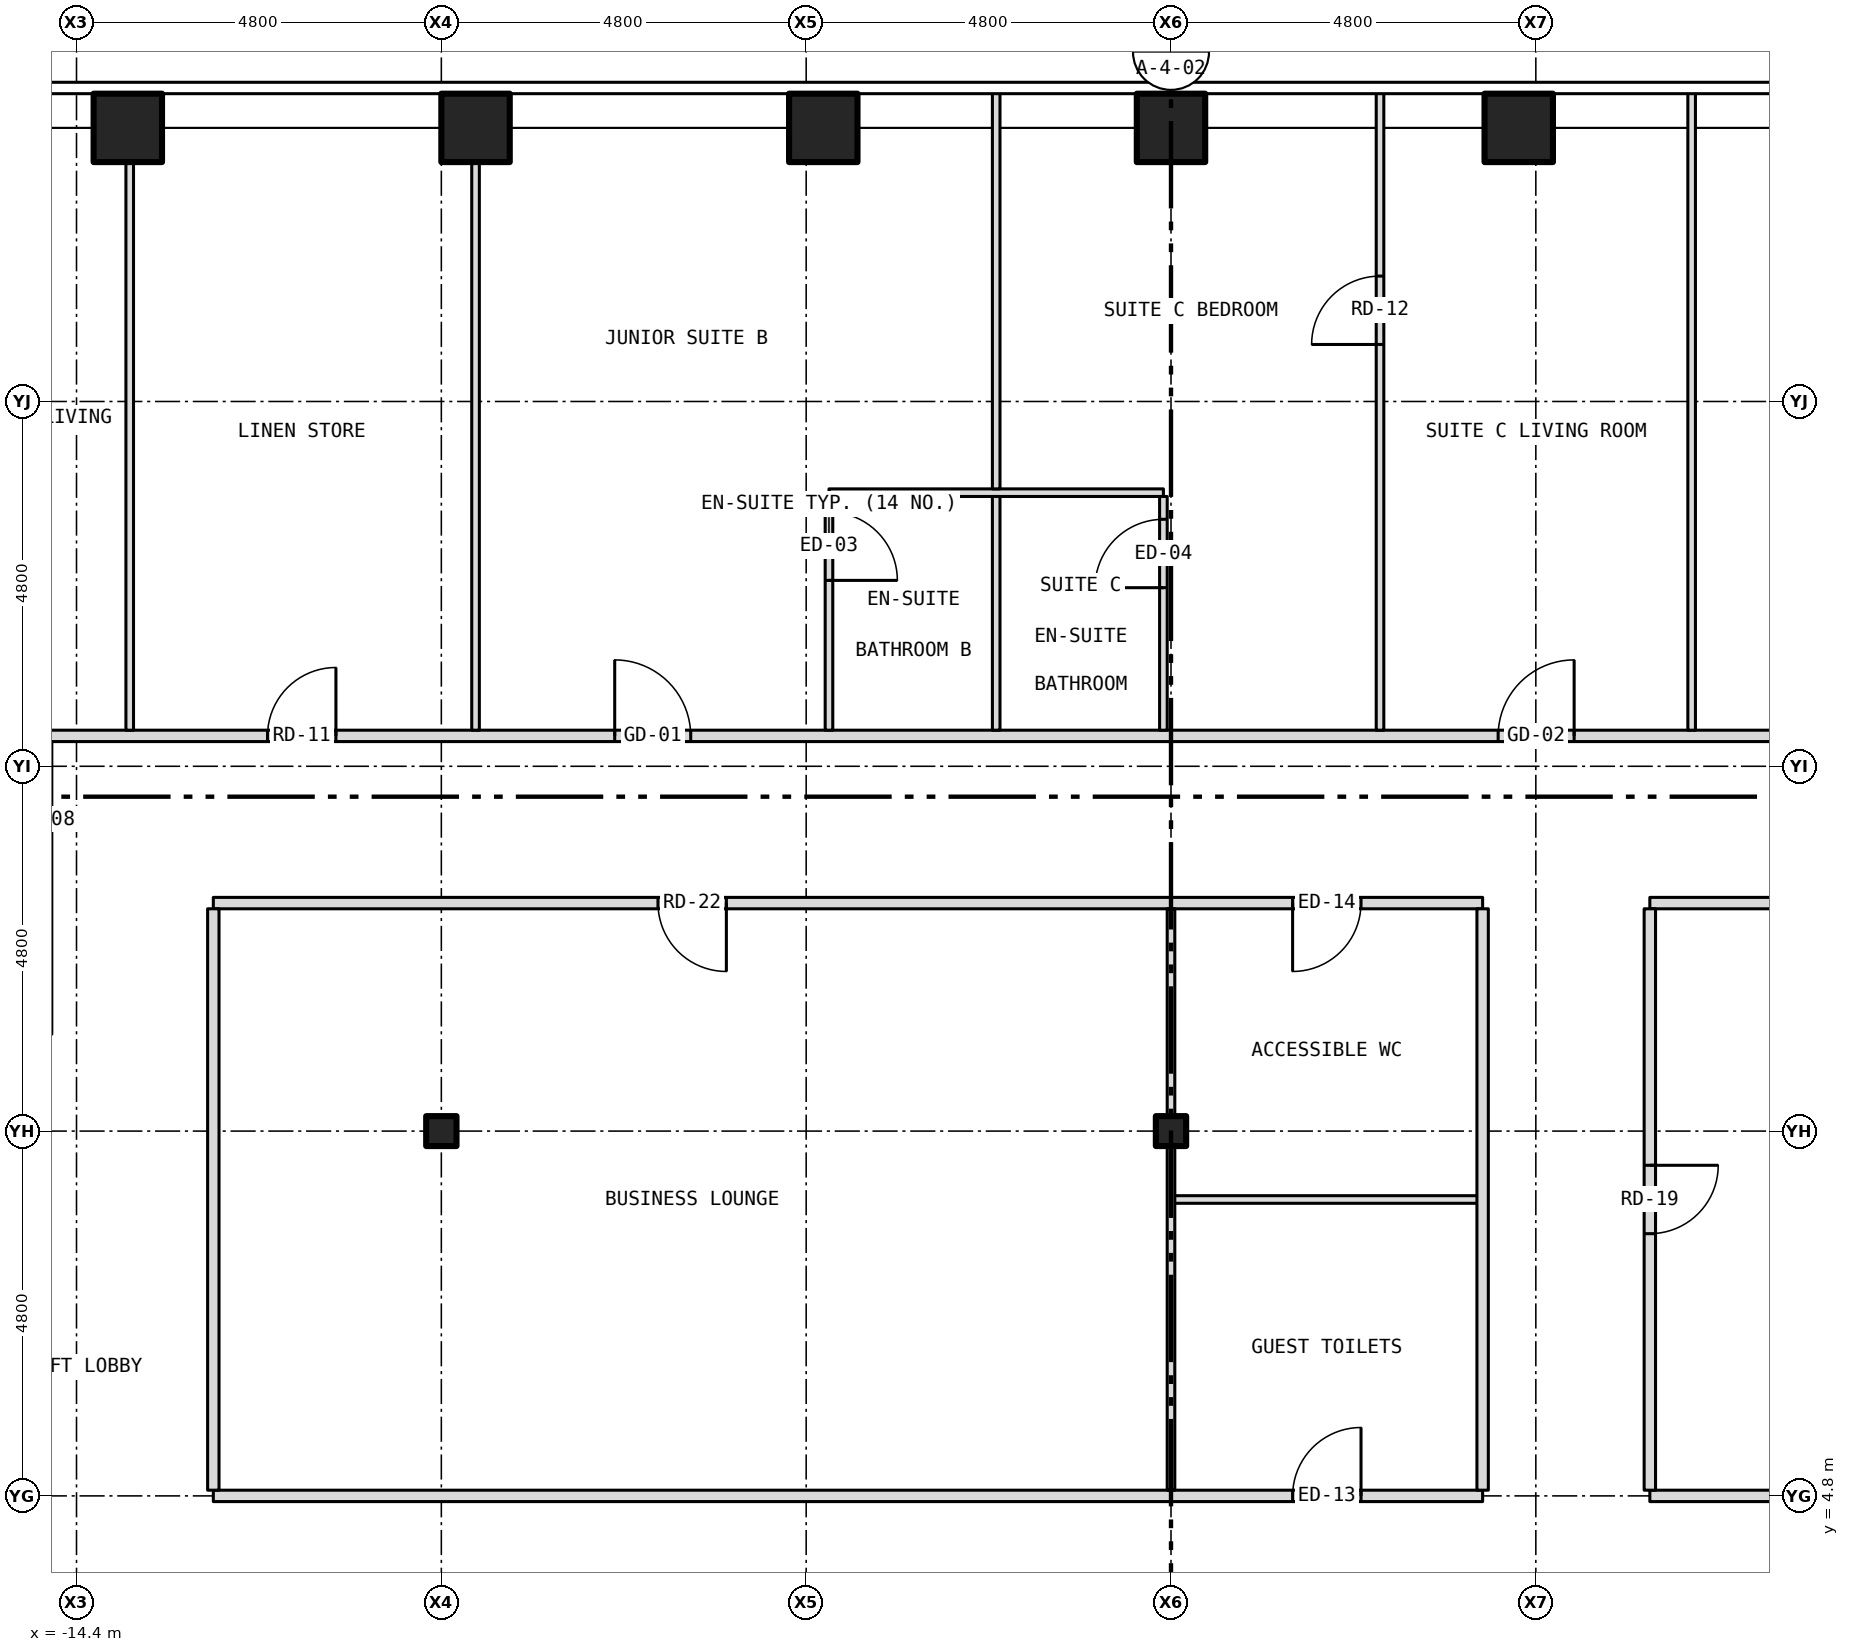
"""IFC4 building model, lengths in metres.
Left out: names, types, materials, properties, quantities, classifications, styles, units other than length and angle.
Written with IfcOpenShell. Run it as: python <this file> out.ifc"""

import sys

from ifc_helpers import new_model, si_unit, direction, frame, frame_2d, origin, origin_2d, place, context, subcontext, project, spatial, rectangle, hollow_rectangle, i_section, extrude, element, fill, save


model = new_model("IFC4")
c1 = context("Model", 3, precision=1e-05, world=origin(), true_north=direction((0.0, 1.0)))
c2 = subcontext(c1, "Body", "Model", "MODEL_VIEW")
j1 = project(units=[si_unit("LENGTHUNIT", "METRE"), si_unit("PLANEANGLEUNIT", "RADIAN")], contexts=[c1])
p1 = place(None, origin())
s1 = spatial("IfcSite", under=j1, at=p1, CompositionType="ELEMENT")
p2 = place(p1, origin())
s2 = spatial("IfcBuilding", under=s1, at=p2, CompositionType="ELEMENT")
p3 = place(p2, frame((0.0, 0.0, 113.5)))
s3 = spatial("IfcBuildingStorey", under=s2, at=p3, CompositionType="ELEMENT", Elevation=113.5)
for number, where, z_axis, x_axis in (
    (1, (-13.725, 22.8, -0.15), (0.0, 0.0, 1.0), (1.0, 0.0, 0.0)),
    (2, (-9.15, 22.8, -0.15), (0.0, 0.0, 1.0), (1.0, 0.0, 0.0)),
    (3, (-4.575, 22.8, -0.15), (0.0, 0.0, 1.0), (1.0, 0.0, 0.0)),
    (4, (0.0, 22.8, -0.15), (0.0, 0.0, 1.0), (1.0, 0.0, 0.0)),
    (5, (4.575, 22.8, -0.15), (0.0, 0.0, 1.0), (1.0, 0.0, 0.0)),
):
    element("IfcColumn", number, at=place(p3, frame(where, z_axis=z_axis, x_axis=x_axis)), inside=s3, PredefinedType="COLUMN", context=c2, shape_type="SweptSolid", body=[
        extrude(hollow_rectangle(XDim=0.9, YDim=0.9, WallThickness=0.05, at=origin_2d()), origin(), (0.0, 0.0, 1.0), 3.5),
    ])
for number, where, z_axis, x_axis in (
    (6, (-9.6, 9.6, -0.15), (0.0, 0.0, 1.0), (1.0, 0.0, 0.0)),
    (7, (0.0, 9.6, -0.15), (0.0, 0.0, 1.0), (1.0, 0.0, 0.0)),
):
    element("IfcColumn", number, at=place(p3, frame(where, z_axis=z_axis, x_axis=x_axis)), inside=s3, PredefinedType="COLUMN", context=c2, shape_type="SweptSolid", body=[
        extrude(i_section(OverallWidth=0.399, OverallDepth=0.394, WebThickness=0.023, FlangeThickness=0.037, at=origin_2d()), origin(), (0.0, 0.0, 1.0), 3.5),
    ])
p4 = place(p3, frame((-12.6, 4.8, 0.0), z_axis=(0.0, 0.0, 1.0), x_axis=(1.0, 0.0, 0.0)))
e8 = element("IfcWall", 8, at=p4, inside=s3, PredefinedType="PARTITIONING", context=c2, shape_type="SweptSolid", body=[
    extrude(rectangle(XDim=16.7, YDim=0.15, at=frame_2d((8.35, 0.0))), origin(), (0.0, 0.0, 1.0), 3.35),
])
p5 = place(p4, frame((14.2, 0.0, 0.0)))
e9 = element("IfcOpeningElement", 9, at=p5, cuts=e8, PredefinedType="OPENING", context=c2, shape_type="SweptSolid", body=[
    extrude(rectangle(XDim=0.9, YDim=2.1, at=frame_2d((0.45, 1.05))), frame((0.0, 0.087, 0.0), z_axis=(0.0, -1.0, 0.0), x_axis=(1.0, 0.0, 0.0)), (0.0, 0.0, 1.0), 0.174),
])
p6 = place(p3, frame((6.3, 4.8, 0.0), z_axis=(0.0, 0.0, 1.0), x_axis=(1.0, 0.0, 0.0)))
e10 = element("IfcWall", 10, at=p6, inside=s3, PredefinedType="PARTITIONING", context=c2, shape_type="SweptSolid", body=[
    extrude(rectangle(XDim=6.3, YDim=0.15, at=frame_2d((3.15, 0.0))), origin(), (0.0, 0.0, 1.0), 3.35),
])
p7 = place(p3, frame((0.0, 8.7, 0.0), z_axis=(0.0, 0.0, 1.0), x_axis=(1.0, 0.0, 0.0)))
e11 = element("IfcWall", 11, at=p7, inside=s3, PredefinedType="PARTITIONING", context=c2, shape_type="SweptSolid", body=[
    extrude(rectangle(XDim=4.1, YDim=0.1, at=frame_2d((2.05, 0.0))), origin(), (0.0, 0.0, 1.0), 3.35),
])
p8 = place(p3, frame((-12.6, 12.6, 0.0), z_axis=(0.0, 0.0, 1.0), x_axis=(1.0, 0.0, 0.0)))
e12 = element("IfcWall", 12, at=p8, inside=s3, PredefinedType="PARTITIONING", context=c2, shape_type="SweptSolid", body=[
    extrude(rectangle(XDim=16.7, YDim=0.15, at=frame_2d((8.35, 0.0))), origin(), (0.0, 0.0, 1.0), 3.35),
])
p9 = place(p8, frame((14.2, 0.0, 0.0)))
e13 = element("IfcOpeningElement", 13, at=p9, cuts=e12, PredefinedType="OPENING", context=c2, shape_type="SweptSolid", body=[
    extrude(rectangle(XDim=0.9, YDim=2.1, at=frame_2d((0.45, 1.05))), frame((0.0, 0.087, 0.0), z_axis=(0.0, -1.0, 0.0), x_axis=(1.0, 0.0, 0.0)), (0.0, 0.0, 1.0), 0.174),
])
p10 = place(p8, frame((5.85, 0.0, 0.0)))
e14 = element("IfcOpeningElement", 14, at=p10, cuts=e12, PredefinedType="OPENING", context=c2, shape_type="SweptSolid", body=[
    extrude(rectangle(XDim=0.9, YDim=2.1, at=frame_2d((0.45, 1.05))), frame((0.0, 0.087, 0.0), z_axis=(0.0, -1.0, 0.0), x_axis=(1.0, 0.0, 0.0)), (0.0, 0.0, 1.0), 0.174),
])
p11 = place(p3, frame((6.3, 12.6, 0.0), z_axis=(0.0, 0.0, 1.0), x_axis=(1.0, 0.0, 0.0)))
e15 = element("IfcWall", 15, at=p11, inside=s3, PredefinedType="PARTITIONING", context=c2, shape_type="SweptSolid", body=[
    extrude(rectangle(XDim=6.3, YDim=0.15, at=frame_2d((3.15, 0.0))), origin(), (0.0, 0.0, 1.0), 3.35),
])
p12 = place(p3, frame((-14.8, 14.8, 0.0), z_axis=(0.0, 0.0, 1.0), x_axis=(1.0, 0.0, 0.0)))
e16 = element("IfcWall", 16, at=p12, inside=s3, PredefinedType="PARTITIONING", context=c2, shape_type="SweptSolid", body=[
    extrude(rectangle(XDim=29.6, YDim=0.15, at=frame_2d((14.8, 0.0))), origin(), (0.0, 0.0, 1.0), 3.35),
])
p13 = place(p12, frame((2.913, 0.0, 0.0)))
e17 = element("IfcOpeningElement", 17, at=p13, cuts=e16, PredefinedType="OPENING", context=c2, shape_type="SweptSolid", body=[
    extrude(rectangle(XDim=0.9, YDim=2.1, at=frame_2d((0.45, 1.05))), frame((0.0, 0.087, 0.0), z_axis=(0.0, -1.0, 0.0), x_axis=(1.0, 0.0, 0.0)), (0.0, 0.0, 1.0), 0.174),
])
p14 = place(p12, frame((7.481, 0.0, 0.0)))
e18 = element("IfcOpeningElement", 18, at=p14, cuts=e16, PredefinedType="OPENING", context=c2, shape_type="SweptSolid", body=[
    extrude(rectangle(XDim=1.0, YDim=2.1, at=frame_2d((0.5, 1.05))), frame((0.0, 0.087, 0.0), z_axis=(0.0, -1.0, 0.0), x_axis=(1.0, 0.0, 0.0)), (0.0, 0.0, 1.0), 0.174),
])
p15 = place(p12, frame((19.104, 0.0, 0.0)))
e19 = element("IfcOpeningElement", 19, at=p15, cuts=e16, PredefinedType="OPENING", context=c2, shape_type="SweptSolid", body=[
    extrude(rectangle(XDim=1.0, YDim=2.1, at=frame_2d((0.5, 1.05))), frame((0.0, 0.087, 0.0), z_axis=(0.0, -1.0, 0.0), x_axis=(1.0, 0.0, 0.0)), (0.0, 0.0, 1.0), 0.174),
])
p16 = place(p12, frame((23.494, 0.0, 0.0)))
e20 = element("IfcOpeningElement", 20, at=p16, cuts=e16, PredefinedType="OPENING", context=c2, shape_type="SweptSolid", body=[
    extrude(rectangle(XDim=1.0, YDim=2.1, at=frame_2d((0.5, 1.05))), frame((0.0, 0.087, 0.0), z_axis=(0.0, -1.0, 0.0), x_axis=(1.0, 0.0, 0.0)), (0.0, 0.0, 1.0), 0.174),
])
p17 = place(p3, frame((-4.5, 18.0, 0.0), z_axis=(0.0, 0.0, 1.0), x_axis=(1.0, 0.0, 0.0)))
e21 = element("IfcWall", 21, at=p17, inside=s3, PredefinedType="PARTITIONING", context=c2, shape_type="SweptSolid", body=[
    extrude(rectangle(XDim=4.4, YDim=0.1, at=frame_2d((2.2, 0.0))), origin(), (0.0, 0.0, 1.0), 3.35),
])
p18 = place(p3, frame((-13.7, 14.875, 0.0), z_axis=(0.0, 0.0, 1.0), x_axis=(0.0, 1.0, 0.0)))
e22 = element("IfcWall", 22, at=p18, inside=s3, PredefinedType="PARTITIONING", context=c2, shape_type="SweptSolid", body=[
    extrude(rectangle(XDim=7.805, YDim=0.1, at=frame_2d((3.902, 0.0))), origin(), (0.0, 0.0, 1.0), 3.35),
])
p19 = place(p3, frame((-12.6, 4.875, 0.0), z_axis=(0.0, 0.0, 1.0), x_axis=(0.0, 1.0, 0.0)))
e23 = element("IfcWall", 23, at=p19, inside=s3, PredefinedType="PARTITIONING", context=c2, shape_type="SweptSolid", body=[
    extrude(rectangle(XDim=7.65, YDim=0.15, at=frame_2d((3.825, 0.0))), origin(), (0.0, 0.0, 1.0), 3.35),
])
p20 = place(p3, frame((-9.15, 14.875, 0.0), z_axis=(0.0, 0.0, 1.0), x_axis=(0.0, 1.0, 0.0)))
e24 = element("IfcWall", 24, at=p20, inside=s3, PredefinedType="PARTITIONING", context=c2, shape_type="SweptSolid", body=[
    extrude(rectangle(XDim=7.805, YDim=0.1, at=frame_2d((3.902, 0.0))), origin(), (0.0, 0.0, 1.0), 3.35),
])
p21 = place(p3, frame((-4.5, 14.875, 0.0), z_axis=(0.0, 0.0, 1.0), x_axis=(0.0, 1.0, 0.0)))
e25 = element("IfcWall", 25, at=p21, inside=s3, PredefinedType="PARTITIONING", context=c2, shape_type="SweptSolid", body=[
    extrude(rectangle(XDim=3.075, YDim=0.1, at=frame_2d((1.538, 0.0))), origin(), (0.0, 0.0, 1.0), 3.35),
])
p22 = place(p21, frame((1.971, 0.0, 0.0)))
e26 = element("IfcOpeningElement", 26, at=p22, cuts=e25, PredefinedType="OPENING", context=c2, shape_type="SweptSolid", body=[
    extrude(rectangle(XDim=0.9, YDim=2.1, at=frame_2d((0.45, 1.05))), frame((0.0, 0.062, 0.0), z_axis=(0.0, -1.0, 0.0), x_axis=(1.0, 0.0, 0.0)), (0.0, 0.0, 1.0), 0.124),
])
p23 = place(p3, frame((-2.3, 14.875, 0.0), z_axis=(0.0, 0.0, 1.0), x_axis=(0.0, 1.0, 0.0)))
e27 = element("IfcWall", 27, at=p23, inside=s3, PredefinedType="PARTITIONING", context=c2, shape_type="SweptSolid", body=[
    extrude(rectangle(XDim=3.075, YDim=0.1, at=frame_2d((1.538, 0.0))), origin(), (0.0, 0.0, 1.0), 3.35),
])
p24 = place(p3, frame((-2.3, 18.05, 0.0), z_axis=(0.0, 0.0, 1.0), x_axis=(0.0, 1.0, 0.0)))
e28 = element("IfcWall", 28, at=p24, inside=s3, PredefinedType="PARTITIONING", context=c2, shape_type="SweptSolid", body=[
    extrude(rectangle(XDim=5.23, YDim=0.1, at=frame_2d((2.615, 0.0))), origin(), (0.0, 0.0, 1.0), 3.35),
])
p25 = place(p3, frame((-0.1, 14.875, 0.0), z_axis=(0.0, 0.0, 1.0), x_axis=(0.0, 1.0, 0.0)))
e29 = element("IfcWall", 29, at=p25, inside=s3, PredefinedType="PARTITIONING", context=c2, shape_type="SweptSolid", body=[
    extrude(rectangle(XDim=3.075, YDim=0.1, at=frame_2d((1.538, 0.0))), origin(), (0.0, 0.0, 1.0), 2.728),
])
p26 = place(p25, frame((1.875, 0.0, 0.0)))
e30 = element("IfcOpeningElement", 30, at=p26, cuts=e29, PredefinedType="OPENING", context=c2, shape_type="SweptSolid", body=[
    extrude(rectangle(XDim=0.9, YDim=2.1, at=frame_2d((0.45, 1.05))), frame((0.0, 0.062, 0.0), z_axis=(0.0, -1.0, 0.0), x_axis=(1.0, 0.0, 0.0)), (0.0, 0.0, 1.0), 0.124),
])
p27 = place(p3, frame((0.0, 4.875, 0.0), z_axis=(0.0, 0.0, 1.0), x_axis=(0.0, 1.0, 0.0)))
e31 = element("IfcWall", 31, at=p27, inside=s3, PredefinedType="PARTITIONING", context=c2, shape_type="SweptSolid", body=[
    extrude(rectangle(XDim=4.526, YDim=0.1, at=frame_2d((2.263, 0.0))), origin(), (0.0, 0.0, 1.0), 2.728),
])
p28 = place(p3, frame((0.0, 9.401, 0.0), z_axis=(0.0, 0.0, 1.0), x_axis=(0.0, 1.0, 0.0)))
e32 = element("IfcWall", 32, at=p28, inside=s3, PredefinedType="PARTITIONING", context=c2, shape_type="SweptSolid", body=[
    extrude(rectangle(XDim=0.398, YDim=0.1, at=frame_2d((0.199, 0.0))), origin(), (0.0, 0.0, 1.0), 3.35),
])
p29 = place(p3, frame((0.0, 9.799, 0.0), z_axis=(0.0, 0.0, 1.0), x_axis=(0.0, 1.0, 0.0)))
e33 = element("IfcWall", 33, at=p29, inside=s3, PredefinedType="PARTITIONING", context=c2, shape_type="SweptSolid", body=[
    extrude(rectangle(XDim=2.726, YDim=0.1, at=frame_2d((1.363, 0.0))), origin(), (0.0, 0.0, 1.0), 2.728),
])
p30 = place(p3, frame((2.75, 14.875, 0.0), z_axis=(0.0, 0.0, 1.0), x_axis=(0.0, 1.0, 0.0)))
e34 = element("IfcWall", 34, at=p30, inside=s3, PredefinedType="PARTITIONING", context=c2, shape_type="SweptSolid", body=[
    extrude(rectangle(XDim=8.405, YDim=0.1, at=frame_2d((4.203, 0.0))), origin(), (0.0, 0.0, 1.0), 3.35),
])
p31 = place(p30, frame((5.075, 0.0, 0.0)))
e35 = element("IfcOpeningElement", 35, at=p31, cuts=e34, PredefinedType="OPENING", context=c2, shape_type="SweptSolid", body=[
    extrude(rectangle(XDim=0.9, YDim=2.1, at=frame_2d((0.45, 1.05))), frame((0.0, 0.062, 0.0), z_axis=(0.0, -1.0, 0.0), x_axis=(1.0, 0.0, 0.0)), (0.0, 0.0, 1.0), 0.124),
])
p32 = place(p3, frame((4.1, 4.875, 0.0), z_axis=(0.0, 0.0, 1.0), x_axis=(0.0, 1.0, 0.0)))
e36 = element("IfcWall", 36, at=p32, inside=s3, PredefinedType="PARTITIONING", context=c2, shape_type="SweptSolid", body=[
    extrude(rectangle(XDim=7.65, YDim=0.15, at=frame_2d((3.825, 0.0))), origin(), (0.0, 0.0, 1.0), 3.35),
])
p33 = place(p3, frame((6.3, 4.875, 0.0), z_axis=(0.0, 0.0, 1.0), x_axis=(0.0, 1.0, 0.0)))
e37 = element("IfcWall", 37, at=p33, inside=s3, PredefinedType="PARTITIONING", context=c2, shape_type="SweptSolid", body=[
    extrude(rectangle(XDim=7.65, YDim=0.15, at=frame_2d((3.825, 0.0))), origin(), (0.0, 0.0, 1.0), 3.35),
])
p34 = place(p33, frame((3.375, 0.0, 0.0)))
e38 = element("IfcOpeningElement", 38, at=p34, cuts=e37, PredefinedType="OPENING", context=c2, shape_type="SweptSolid", body=[
    extrude(rectangle(XDim=0.9, YDim=2.1, at=frame_2d((0.45, 1.05))), frame((0.0, 0.087, 0.0), z_axis=(0.0, -1.0, 0.0), x_axis=(1.0, 0.0, 0.0)), (0.0, 0.0, 1.0), 0.174),
])
p35 = place(p3, frame((6.85, 14.875, 0.0), z_axis=(0.0, 0.0, 1.0), x_axis=(0.0, 1.0, 0.0)))
e39 = element("IfcWall", 39, at=p35, inside=s3, PredefinedType="PARTITIONING", context=c2, shape_type="SweptSolid", body=[
    extrude(rectangle(XDim=8.405, YDim=0.1, at=frame_2d((4.203, 0.0))), origin(), (0.0, 0.0, 1.0), 3.35),
])
p36 = place(p13, origin())
e40 = element("IfcDoor", 40, at=p36, inside=s3, OperationType="SINGLE_SWING_RIGHT", PredefinedType="DOOR", context=c2, shape_type="SweptSolid", body=[
    extrude(rectangle(XDim=0.9, YDim=2.1, at=frame_2d((0.45, 1.05))), frame((0.0, 0.025, 0.0), z_axis=(0.0, -1.0, 0.0), x_axis=(1.0, 0.0, 0.0)), (0.0, 0.0, 1.0), 0.05),
])
fill(e17, e40)
p37 = place(p14, origin())
e41 = element("IfcDoor", 41, at=p37, inside=s3, OperationType="SINGLE_SWING_LEFT", PredefinedType="DOOR", context=c2, shape_type="SweptSolid", body=[
    extrude(rectangle(XDim=1.0, YDim=2.1, at=frame_2d((0.5, 1.05))), frame((0.0, 0.025, 0.0), z_axis=(0.0, -1.0, 0.0), x_axis=(1.0, 0.0, 0.0)), (0.0, 0.0, 1.0), 0.05),
])
fill(e18, e41)
p38 = place(p22, origin())
e42 = element("IfcDoor", 42, at=p38, inside=s3, OperationType="SINGLE_SWING_LEFT", PredefinedType="DOOR", context=c2, shape_type="SweptSolid", body=[
    extrude(rectangle(XDim=0.9, YDim=2.1, at=frame_2d((0.45, 1.05))), frame((0.0, 0.025, 0.0), z_axis=(0.0, -1.0, 0.0), x_axis=(1.0, 0.0, 0.0)), (0.0, 0.0, 1.0), 0.05),
])
fill(e26, e42)
p39 = place(p15, origin())
e43 = element("IfcDoor", 43, at=p39, inside=s3, OperationType="SINGLE_SWING_RIGHT", PredefinedType="DOOR", context=c2, shape_type="SweptSolid", body=[
    extrude(rectangle(XDim=1.0, YDim=2.1, at=frame_2d((0.5, 1.05))), frame((0.0, 0.025, 0.0), z_axis=(0.0, -1.0, 0.0), x_axis=(1.0, 0.0, 0.0)), (0.0, 0.0, 1.0), 0.05),
])
fill(e19, e43)
p40 = place(p31, origin())
e44 = element("IfcDoor", 44, at=p40, inside=s3, OperationType="SINGLE_SWING_LEFT", PredefinedType="DOOR", context=c2, shape_type="SweptSolid", body=[
    extrude(rectangle(XDim=0.9, YDim=2.1, at=frame_2d((0.45, 1.05))), frame((0.0, 0.025, 0.0), z_axis=(0.0, -1.0, 0.0), x_axis=(1.0, 0.0, 0.0)), (0.0, 0.0, 1.0), 0.05),
])
fill(e35, e44)
p41 = place(p26, origin())
e45 = element("IfcDoor", 45, at=p41, inside=s3, OperationType="SINGLE_SWING_LEFT", PredefinedType="DOOR", context=c2, shape_type="SweptSolid", body=[
    extrude(rectangle(XDim=0.9, YDim=2.1, at=frame_2d((0.45, 1.05))), frame((0.0, 0.025, 0.0), z_axis=(0.0, -1.0, 0.0), x_axis=(1.0, 0.0, 0.0)), (0.0, 0.0, 1.0), 0.05),
])
fill(e30, e45)
p42 = place(p5, origin())
e46 = element("IfcDoor", 46, at=p42, inside=s3, OperationType="SINGLE_SWING_RIGHT", PredefinedType="DOOR", context=c2, shape_type="SweptSolid", body=[
    extrude(rectangle(XDim=0.9, YDim=2.1, at=frame_2d((0.45, 1.05))), frame((0.0, 0.025, 0.0), z_axis=(0.0, -1.0, 0.0), x_axis=(1.0, 0.0, 0.0)), (0.0, 0.0, 1.0), 0.05),
])
fill(e9, e46)
p43 = place(p9, origin())
e47 = element("IfcDoor", 47, at=p43, inside=s3, OperationType="SINGLE_SWING_LEFT", PredefinedType="DOOR", context=c2, shape_type="SweptSolid", body=[
    extrude(rectangle(XDim=0.9, YDim=2.1, at=frame_2d((0.45, 1.05))), frame((0.0, 0.025, 0.0), z_axis=(0.0, -1.0, 0.0), x_axis=(1.0, 0.0, 0.0)), (0.0, 0.0, 1.0), 0.05),
])
fill(e13, e47)
p44 = place(p34, origin())
e48 = element("IfcDoor", 48, at=p44, inside=s3, OperationType="SINGLE_SWING_RIGHT", PredefinedType="DOOR", context=c2, shape_type="SweptSolid", body=[
    extrude(rectangle(XDim=0.9, YDim=2.1, at=frame_2d((0.45, 1.05))), frame((0.0, 0.025, 0.0), z_axis=(0.0, -1.0, 0.0), x_axis=(1.0, 0.0, 0.0)), (0.0, 0.0, 1.0), 0.05),
])
fill(e38, e48)
p45 = place(p10, origin())
e49 = element("IfcDoor", 49, at=p45, inside=s3, OperationType="SINGLE_SWING_RIGHT", PredefinedType="DOOR", context=c2, shape_type="SweptSolid", body=[
    extrude(rectangle(XDim=0.9, YDim=2.1, at=frame_2d((0.45, 1.05))), frame((0.0, 0.025, 0.0), z_axis=(0.0, -1.0, 0.0), x_axis=(1.0, 0.0, 0.0)), (0.0, 0.0, 1.0), 0.05),
])
fill(e14, e49)
save(model, sys.argv[1])
